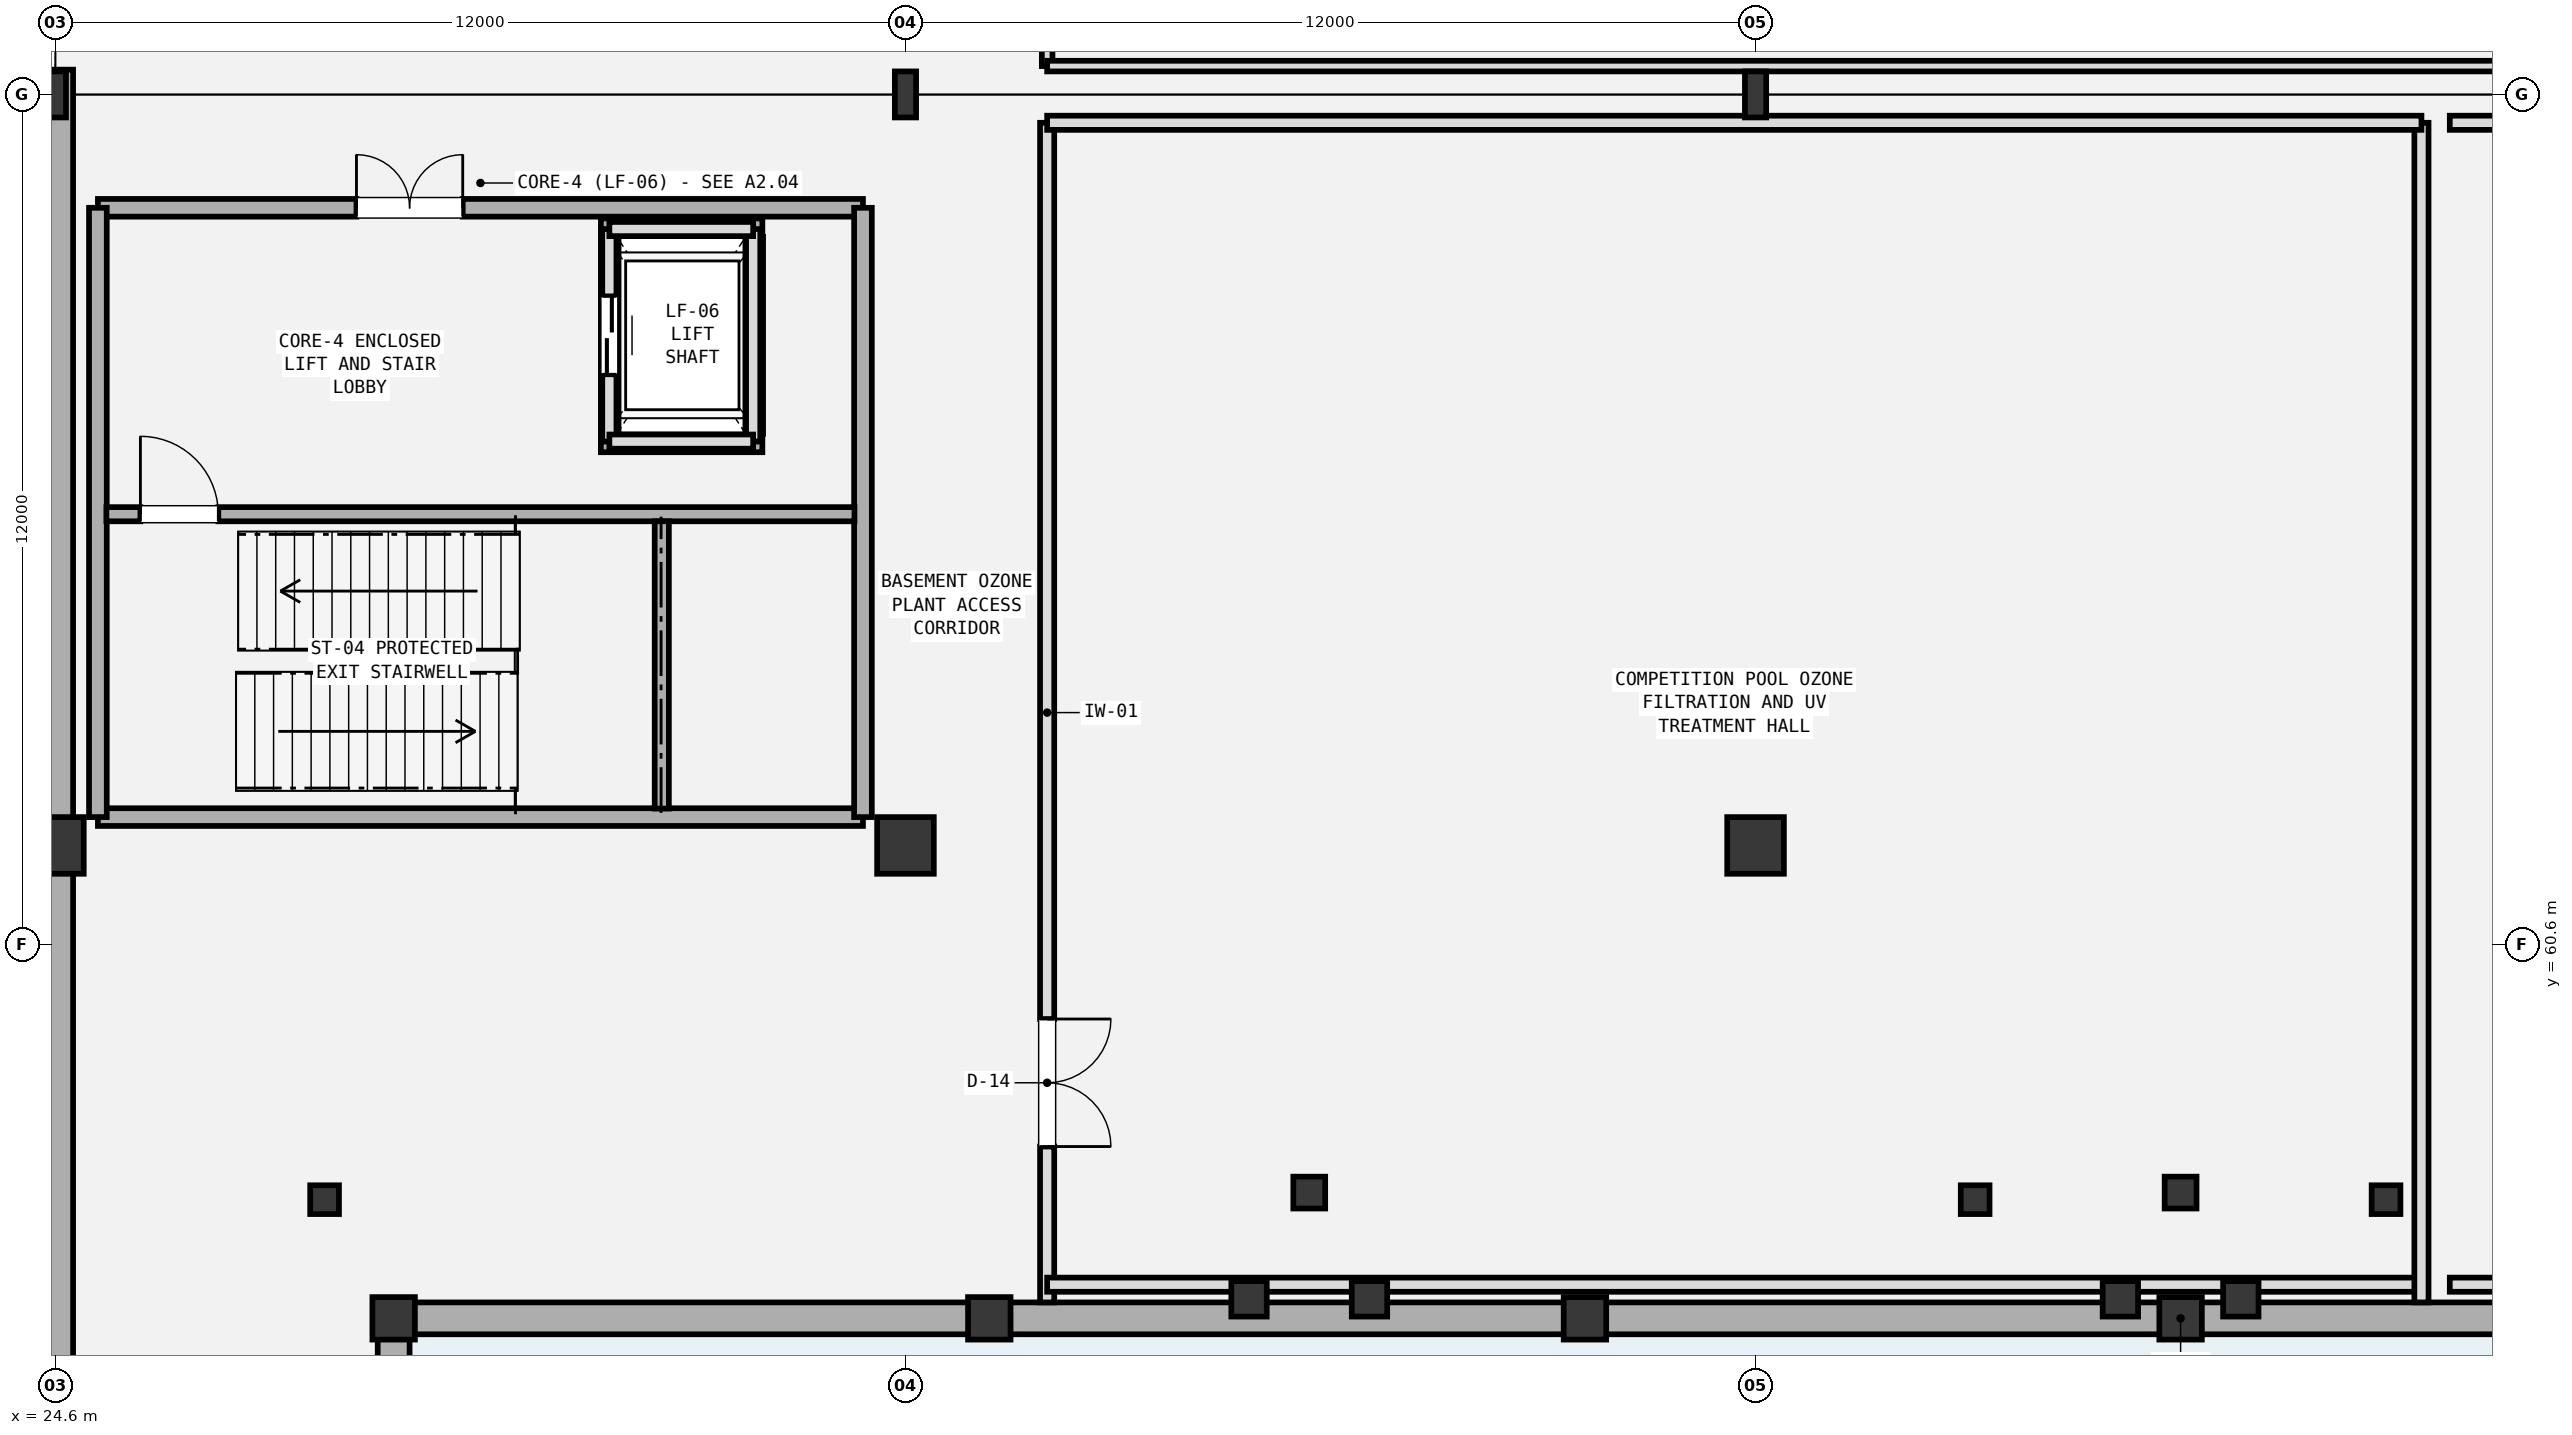
"""IFC4 building model, lengths in metres.
Left out: names, types, materials, properties, quantities, classifications, styles, units other than length and angle.
Written with IfcOpenShell. Run it as: python <this file> out.ifc"""

import sys

from ifc_helpers import new_model, si_unit, direction, frame, frame_2d, origin, origin_2d, place, context, subcontext, project, spatial, rectangle, circle, hollow_circle, i_section, extrude, element, fill, save


model = new_model("IFC4")
c1 = context("Model", 3, precision=1e-05, world=origin(), true_north=direction((0.0, 1.0)))
c2 = subcontext(c1, "Body", "Model", "MODEL_VIEW")
j1 = project(units=[si_unit("LENGTHUNIT", "METRE"), si_unit("PLANEANGLEUNIT", "RADIAN")], contexts=[c1])
p1 = place(None, origin())
s1 = spatial("IfcSite", under=j1, at=p1, CompositionType="ELEMENT")
p2 = place(p1, origin())
s2 = spatial("IfcBuilding", under=s1, at=p2, CompositionType="ELEMENT")
p3 = place(p2, frame((0.0, 0.0, -5.4)))
s3 = spatial("IfcBuildingStorey", under=s2, at=p3, CompositionType="ELEMENT", Elevation=-5.4)
for number, where, z_axis, x_axis in (
    (1, (32.3, 67.675, -1.6), (0.0, 0.0, 1.0), (1.0, 0.0, 0.0)),
    (2, (32.3, 70.725, -1.6), (0.0, 0.0, 1.0), (1.0, 0.0, 0.0)),
):
    element("IfcWall", number, at=place(p3, frame(where, z_axis=z_axis, x_axis=x_axis)), inside=s3, PredefinedType="SHEAR", context=c2, shape_type="SweptSolid", body=[
        extrude(rectangle(XDim=2.28, YDim=0.25, at=frame_2d((1.14, 0.0))), origin(), (0.0, 0.0, 1.0), 1.05),
    ])
for number, where, z_axis, x_axis in (
    (3, (32.425, 67.81, -1.6), (0.0, 0.0, 1.0), (0.0, 1.0, 0.0)),
    (4, (34.465, 67.81, -1.6), (0.0, 0.0, 1.0), (0.0, 1.0, 0.0)),
):
    element("IfcWall", number, at=place(p3, frame(where, z_axis=z_axis, x_axis=x_axis)), inside=s3, PredefinedType="SHEAR", context=c2, shape_type="SweptSolid", body=[
        extrude(rectangle(XDim=2.78, YDim=0.25, at=frame_2d((1.39, 0.0))), origin(), (0.0, 0.0, 1.0), 1.05),
    ])
for number, where, z_axis, x_axis in (
    (5, (29.375, 55.325, -0.55), (0.0, 0.0, 1.0), (1.0, 0.0, 0.0)),
    (6, (37.783, 55.325, -0.55), (0.0, 0.0, 1.0), (1.0, 0.0, 0.0)),
    (7, (46.192, 55.325, -0.55), (0.0, 0.0, 1.0), (1.0, 0.0, 0.0)),
    (8, (54.6, 55.325, -0.55), (0.0, 0.0, 1.0), (1.0, 0.0, 0.0)),
):
    element("IfcColumn", number, at=place(p3, frame(where, z_axis=z_axis, x_axis=x_axis)), inside=s3, PredefinedType="COLUMN", context=c2, shape_type="SweptSolid", body=[
        extrude(rectangle(XDim=0.6, YDim=0.6, at=origin_2d()), origin(), (0.0, 0.0, 1.0), 3.05),
    ])
p4 = place(p3, frame((29.15, 55.325, 3.2), z_axis=(0.0, 0.0, 1.0), x_axis=(1.0, 0.0, 0.0)))
e9 = element("IfcWall", 9, at=p4, inside=s3, PredefinedType="SOLIDWALL", context=c2, shape_type="SweptSolid", body=[
    extrude(rectangle(XDim=50.9, YDim=0.45, at=frame_2d((25.45, 0.0))), origin(), (0.0, 0.0, 1.0), 1.86),
])
p5 = place(p3, frame((29.375, 30.1, 3.2), z_axis=(0.0, 0.0, 1.0), x_axis=(0.0, 1.0, 0.0)))
e10 = element("IfcWall", 10, at=p5, inside=s3, PredefinedType="SOLIDWALL", context=c2, shape_type="SweptSolid", body=[
    extrude(rectangle(XDim=25.0, YDim=0.45, at=frame_2d((12.5, 0.0))), origin(), (0.0, 0.0, 1.0), 1.86),
])
p6 = place(p3, frame((24.6, 23.2, 0.0), z_axis=(0.0, 0.0, 1.0), x_axis=(0.0, 1.0, 0.0)))
e11 = element("IfcWall", 11, at=p6, inside=s3, PredefinedType="USERDEFINED", context=c2, shape_type="SweptSolid", body=[
    extrude(rectangle(XDim=49.75, YDim=0.5, at=frame_2d((24.875, 0.0))), origin(), (0.0, 0.0, 1.0), 4.98),
])
for number, where, z_axis, x_axis in (
    (12, (41.45, 55.6, 0.0), (0.0, 0.0, 1.0), (1.0, 0.0, 0.0)),
    (13, (43.15, 55.6, 0.0), (0.0, 0.0, 1.0), (1.0, 0.0, 0.0)),
    (14, (53.75, 55.6, 0.0), (0.0, 0.0, 1.0), (1.0, 0.0, 0.0)),
    (15, (55.45, 55.6, 0.0), (0.0, 0.0, 1.0), (1.0, 0.0, 0.0)),
):
    element("IfcColumn", number, at=place(p3, frame(where, z_axis=z_axis, x_axis=x_axis)), inside=s3, PredefinedType="COLUMN", context=c2, shape_type="SweptSolid", body=[
        extrude(rectangle(XDim=0.5, YDim=0.5, at=origin_2d()), origin(), (0.0, 0.0, 1.0), 4.98),
    ])
p7 = place(p3, frame((24.6, 62.0, -0.55), z_axis=(0.0, 0.0, 1.0), x_axis=(1.0, 0.0, 0.0)))
e16 = element("IfcColumn", 16, at=p7, inside=s3, PredefinedType="COLUMN", context=c2, shape_type="SweptSolid", body=[
    extrude(circle(Radius=0.4, at=origin_2d()), origin(), (0.0, 0.0, 1.0), 5.95),
])
p8 = place(p3, frame((24.6, 72.6, -0.55), z_axis=(0.0, 0.0, 1.0), x_axis=(1.0, 0.0, 0.0)))
e17 = element("IfcColumn", 17, at=p8, inside=s3, PredefinedType="COLUMN", context=c2, shape_type="SweptSolid", body=[
    extrude(i_section(OverallWidth=0.3, OverallDepth=0.65, WebThickness=0.016, FlangeThickness=0.031, FilletRadius=0.027, at=origin_2d()), origin(), (0.0, 0.0, 1.0), 5.95),
])
p9 = place(p3, frame((36.6, 62.0, -0.55), z_axis=(0.0, 0.0, 1.0), x_axis=(1.0, 0.0, 0.0)))
e18 = element("IfcColumn", 18, at=p9, inside=s3, PredefinedType="COLUMN", context=c2, shape_type="SweptSolid", body=[
    extrude(circle(Radius=0.4, at=origin_2d()), origin(), (0.0, 0.0, 1.0), 5.95),
])
p10 = place(p3, frame((36.6, 72.6, -0.55), z_axis=(0.0, 0.0, 1.0), x_axis=(1.0, 0.0, 0.0)))
e19 = element("IfcColumn", 19, at=p10, inside=s3, PredefinedType="COLUMN", context=c2, shape_type="SweptSolid", body=[
    extrude(i_section(OverallWidth=0.3, OverallDepth=0.65, WebThickness=0.016, FlangeThickness=0.031, FilletRadius=0.027, at=origin_2d()), origin(), (0.0, 0.0, 1.0), 5.95),
])
p11 = place(p3, frame((48.6, 62.0, -0.55), z_axis=(0.0, 0.0, 1.0), x_axis=(1.0, 0.0, 0.0)))
e20 = element("IfcColumn", 20, at=p11, inside=s3, PredefinedType="COLUMN", context=c2, shape_type="SweptSolid", body=[
    extrude(circle(Radius=0.4, at=origin_2d()), origin(), (0.0, 0.0, 1.0), 5.95),
])
p12 = place(p3, frame((48.6, 72.6, -0.55), z_axis=(0.0, 0.0, 1.0), x_axis=(1.0, 0.0, 0.0)))
e21 = element("IfcColumn", 21, at=p12, inside=s3, PredefinedType="COLUMN", context=c2, shape_type="SweptSolid", body=[
    extrude(i_section(OverallWidth=0.3, OverallDepth=0.65, WebThickness=0.016, FlangeThickness=0.031, FilletRadius=0.027, at=origin_2d()), origin(), (0.0, 0.0, 1.0), 5.95),
])
for number, where, z_axis, x_axis in (
    (22, (28.4, 57.0, 0.0), (0.0, 0.0, 1.0), (1.0, 0.0, 0.0)),
    (23, (51.7, 57.0, 0.0), (0.0, 0.0, 1.0), (1.0, 0.0, 0.0)),
    (24, (57.5, 57.0, 0.0), (0.0, 0.0, 1.0), (1.0, 0.0, 0.0)),
):
    element("IfcColumn", number, at=place(p3, frame(where, z_axis=z_axis, x_axis=x_axis)), inside=s3, PredefinedType="COLUMN", context=c2, shape_type="SweptSolid", body=[
        extrude(hollow_circle(Radius=0.203, WallThickness=0.016, at=origin_2d()), origin(), (0.0, 0.0, 1.0), 4.98),
    ])
p13 = place(p3, frame((25.2, 62.4, -0.15), z_axis=(0.0, 0.0, 1.0), x_axis=(1.0, 0.0, 0.0)))
e25 = element("IfcWall", 25, at=p13, inside=s3, PredefinedType="SHEAR", context=c2, shape_type="SweptSolid", body=[
    extrude(rectangle(XDim=10.8, YDim=0.25, at=frame_2d((5.4, 0.0))), origin(), (0.0, 0.0, 1.0), 5.13),
])
p14 = place(p3, frame((25.2, 71.0, -0.15), z_axis=(0.0, 0.0, 1.0), x_axis=(1.0, 0.0, 0.0)))
e26 = element("IfcWall", 26, at=p14, inside=s3, PredefinedType="SHEAR", context=c2, shape_type="SweptSolid", body=[
    extrude(rectangle(XDim=10.8, YDim=0.25, at=frame_2d((5.4, 0.0))), origin(), (0.0, 0.0, 1.0), 5.13),
])
p15 = place(p14, frame((3.65, 0.0, 0.15)))
e27 = element("IfcOpeningElement", 27, at=p15, cuts=e26, PredefinedType="OPENING", context=c2, shape_type="SweptSolid", body=[
    extrude(rectangle(XDim=1.5, YDim=2.2, at=frame_2d((0.75, 1.1))), frame((0.0, 0.135, 0.0), z_axis=(0.0, -1.0, 0.0), x_axis=(1.0, 0.0, 0.0)), (0.0, 0.0, 1.0), 0.27),
])
for number, where, z_axis, x_axis in (
    (28, (25.2, 62.4, -0.15), (0.0, 0.0, 1.0), (0.0, 1.0, 0.0)),
    (29, (36.0, 62.4, -0.15), (0.0, 0.0, 1.0), (0.0, 1.0, 0.0)),
):
    element("IfcWall", number, at=place(p3, frame(where, z_axis=z_axis, x_axis=x_axis)), inside=s3, PredefinedType="SHEAR", context=c2, shape_type="SweptSolid", body=[
        extrude(rectangle(XDim=8.6, YDim=0.25, at=frame_2d((4.3, 0.0))), origin(), (0.0, 0.0, 1.0), 5.13),
    ])
p16 = place(p3, frame((25.32, 66.675, -0.15), z_axis=(0.0, 0.0, 1.0), x_axis=(1.0, 0.0, 0.0)))
e30 = element("IfcWall", 30, at=p16, inside=s3, PredefinedType="SHEAR", context=c2, shape_type="SweptSolid", body=[
    extrude(rectangle(XDim=10.56, YDim=0.2, at=frame_2d((5.28, 0.0))), origin(), (0.0, 0.0, 1.0), 5.13),
])
p17 = place(p16, frame((0.48, 0.0, 0.15)))
e31 = element("IfcOpeningElement", 31, at=p17, cuts=e30, PredefinedType="OPENING", context=c2, shape_type="SweptSolid", body=[
    extrude(rectangle(XDim=1.1, YDim=2.2, at=frame_2d((0.55, 1.1))), frame((0.0, 0.11, 0.0), z_axis=(0.0, -1.0, 0.0), x_axis=(1.0, 0.0, 0.0)), (0.0, 0.0, 1.0), 0.22),
])
p18 = place(p3, frame((33.16, 62.52, -0.15), z_axis=(0.0, 0.0, 1.0), x_axis=(0.0, 1.0, 0.0)))
e32 = element("IfcWall", 32, at=p18, inside=s3, PredefinedType="SHEAR", context=c2, shape_type="SweptSolid", body=[
    extrude(rectangle(XDim=4.055, YDim=0.2, at=frame_2d((2.027, 0.0))), origin(), (0.0, 0.0, 1.0), 5.13),
])
p19 = place(p3, frame((32.42, 67.7, -0.15), z_axis=(0.0, 0.0, 1.0), x_axis=(0.0, 1.0, 0.0)))
e33 = element("IfcWall", 33, at=p19, inside=s3, PredefinedType="SOLIDWALL", context=c2, shape_type="SweptSolid", body=[
    extrude(rectangle(XDim=3.0, YDim=0.2, at=frame_2d((1.5, 0.0))), origin(), (0.0, 0.0, 1.0), 5.13),
])
p20 = place(p19, frame((0.95, 0.0, 0.15)))
e34 = element("IfcOpeningElement", 34, at=p20, cuts=e33, PredefinedType="OPENING", context=c2, shape_type="SweptSolid", body=[
    extrude(rectangle(XDim=1.1, YDim=2.2, at=frame_2d((0.55, 1.1))), frame((0.0, 0.11, 0.0), z_axis=(0.0, -1.0, 0.0), x_axis=(1.0, 0.0, 0.0)), (0.0, 0.0, 1.0), 0.22),
])
p21 = place(p3, frame((34.45, 67.7, -0.15), z_axis=(0.0, 0.0, 1.0), x_axis=(0.0, 1.0, 0.0)))
e35 = element("IfcWall", 35, at=p21, inside=s3, PredefinedType="SOLIDWALL", context=c2, shape_type="SweptSolid", body=[
    extrude(rectangle(XDim=3.0, YDim=0.2, at=frame_2d((1.5, 0.0))), origin(), (0.0, 0.0, 1.0), 5.13),
])
for number, where, z_axis, x_axis in (
    (36, (32.42, 67.7, -0.15), (0.0, 0.0, 1.0), (1.0, 0.0, 0.0)),
    (37, (32.42, 70.7, -0.15), (0.0, 0.0, 1.0), (1.0, 0.0, 0.0)),
):
    element("IfcWall", number, at=place(p3, frame(where, z_axis=z_axis, x_axis=x_axis)), inside=s3, PredefinedType="SOLIDWALL", context=c2, shape_type="SweptSolid", body=[
        extrude(rectangle(XDim=2.03, YDim=0.2, at=frame_2d((1.015, 0.0))), origin(), (0.0, 0.0, 1.0), 5.13),
    ])
p22 = place(p3, frame((38.6, 55.55, 0.0), z_axis=(0.0, 0.0, 1.0), x_axis=(0.0, 1.0, 0.0)))
e38 = element("IfcWall", 38, at=p22, inside=s3, PredefinedType="SOLIDWALL", context=c2, shape_type="SweptSolid", body=[
    extrude(rectangle(XDim=16.65, YDim=0.2, at=frame_2d((8.325, 0.0))), origin(), (0.0, 0.0, 1.0), 3.8),
])
p23 = place(p22, frame((2.2, 0.0, 0.0)))
e39 = element("IfcOpeningElement", 39, at=p23, cuts=e38, PredefinedType="OPENING", context=c2, shape_type="SweptSolid", body=[
    extrude(rectangle(XDim=1.8, YDim=2.4, at=frame_2d((0.9, 1.2))), frame((0.0, 0.11, 0.0), z_axis=(0.0, -1.0, 0.0), x_axis=(1.0, 0.0, 0.0)), (0.0, 0.0, 1.0), 0.22),
])
p24 = place(p3, frame((38.6, 55.8, 0.0), z_axis=(0.0, 0.0, 1.0), x_axis=(1.0, 0.0, 0.0)))
e40 = element("IfcWall", 40, at=p24, inside=s3, PredefinedType="SOLIDWALL", context=c2, shape_type="SweptSolid", body=[
    extrude(rectangle(XDim=19.4, YDim=0.2, at=frame_2d((9.7, 0.0))), origin(), (0.0, 0.0, 1.0), 3.8),
])
p25 = place(p3, frame((58.0, 55.55, 0.0), z_axis=(0.0, 0.0, 1.0), x_axis=(0.0, 1.0, 0.0)))
e41 = element("IfcWall", 41, at=p25, inside=s3, PredefinedType="SOLIDWALL", context=c2, shape_type="SweptSolid", body=[
    extrude(rectangle(XDim=16.65, YDim=0.2, at=frame_2d((8.325, 0.0))), origin(), (0.0, 0.0, 1.0), 3.8),
])
p26 = place(p3, frame((38.6, 72.2, 0.0), z_axis=(0.0, 0.0, 1.0), x_axis=(1.0, 0.0, 0.0)))
e42 = element("IfcWall", 42, at=p26, inside=s3, PredefinedType="SOLIDWALL", context=c2, shape_type="SweptSolid", body=[
    extrude(rectangle(XDim=19.4, YDim=0.2, at=frame_2d((9.7, 0.0))), origin(), (0.0, 0.0, 1.0), 3.78),
])
p27 = place(p3, frame((58.4, 55.8, 0.0), z_axis=(0.0, 0.0, 1.0), x_axis=(1.0, 0.0, 0.0)))
e43 = element("IfcWall", 43, at=p27, inside=s3, PredefinedType="SOLIDWALL", context=c2, shape_type="SweptSolid", body=[
    extrude(rectangle(XDim=19.6, YDim=0.2, at=frame_2d((9.8, 0.0))), origin(), (0.0, 0.0, 1.0), 3.8),
])
p28 = place(p27, frame((5.0, 0.0, 0.0)))
e44 = element("IfcOpeningElement", 44, at=p28, cuts=e43, PredefinedType="OPENING", context=c2, shape_type="SweptSolid", body=[
    extrude(rectangle(XDim=1.8, YDim=2.4, at=frame_2d((0.9, 1.2))), frame((0.0, 0.11, 0.0), z_axis=(0.0, -1.0, 0.0), x_axis=(1.0, 0.0, 0.0)), (0.0, 0.0, 1.0), 0.22),
])
p29 = place(p3, frame((58.4, 72.2, 0.0), z_axis=(0.0, 0.0, 1.0), x_axis=(1.0, 0.0, 0.0)))
e45 = element("IfcWall", 45, at=p29, inside=s3, PredefinedType="SOLIDWALL", context=c2, shape_type="SweptSolid", body=[
    extrude(rectangle(XDim=19.6, YDim=0.2, at=frame_2d((9.8, 0.0))), origin(), (0.0, 0.0, 1.0), 3.78),
])
p30 = place(p3, frame((38.6, 73.0, 0.0), z_axis=(0.0, 0.0, 1.0), x_axis=(0.0, 1.0, 0.0)))
e46 = element("IfcWall", 46, at=p30, inside=s3, PredefinedType="PARTITIONING", context=c2, shape_type="SweptSolid", body=[
    extrude(rectangle(XDim=17.0, YDim=0.15, at=frame_2d((8.5, 0.0))), origin(), (0.0, 0.0, 1.0), 3.8),
])
p31 = place(p30, frame((6.0, 0.0, 0.0)))
e47 = element("IfcOpeningElement", 47, at=p31, cuts=e46, PredefinedType="OPENING", context=c2, shape_type="SweptSolid", body=[
    extrude(rectangle(XDim=1.6, YDim=2.2, at=frame_2d((0.8, 1.1))), frame((0.0, 0.085, 0.0), z_axis=(0.0, -1.0, 0.0), x_axis=(1.0, 0.0, 0.0)), (0.0, 0.0, 1.0), 0.17),
])
p32 = place(p3, frame((38.6, 73.0, 0.0), z_axis=(0.0, 0.0, 1.0), x_axis=(1.0, 0.0, 0.0)))
e48 = element("IfcWall", 48, at=p32, inside=s3, PredefinedType="PARTITIONING", context=c2, shape_type="SweptSolid", body=[
    extrude(rectangle(XDim=21.75, YDim=0.15, at=frame_2d((10.875, 0.0))), origin(), (0.0, 0.0, 1.0), 3.78),
])
for number, where, z_axis, x_axis in (
    (49, (42.3, 57.1, 0.0), (0.0, 0.0, 1.0), (1.0, 0.0, 0.0)),
    (50, (54.6, 57.1, 0.0), (0.0, 0.0, 1.0), (1.0, 0.0, 0.0)),
):
    element("IfcColumn", number, at=place(p3, frame(where, z_axis=z_axis, x_axis=x_axis)), inside=s3, PredefinedType="COLUMN", context=c2, shape_type="SweptSolid", body=[
        extrude(rectangle(XDim=0.45, YDim=0.45, at=origin_2d()), origin(), (0.0, 0.0, 1.0), 4.98),
    ])
p33 = place(p15, origin())
e51 = element("IfcDoor", 51, at=p33, inside=s3, OperationType="DOUBLE_DOOR_SINGLE_SWING", PredefinedType="DOOR", context=c2, shape_type="SweptSolid", body=[
    extrude(rectangle(XDim=1.5, YDim=2.2, at=frame_2d((0.75, 1.1))), frame((0.0, 0.025, 0.0), z_axis=(0.0, -1.0, 0.0), x_axis=(1.0, 0.0, 0.0)), (0.0, 0.0, 1.0), 0.05),
])
fill(e27, e51)
p34 = place(p17, origin())
e52 = element("IfcDoor", 52, at=p34, inside=s3, OperationType="SINGLE_SWING_LEFT", PredefinedType="DOOR", context=c2, shape_type="SweptSolid", body=[
    extrude(rectangle(XDim=1.1, YDim=2.2, at=frame_2d((0.55, 1.1))), frame((0.0, 0.025, 0.0), z_axis=(0.0, -1.0, 0.0), x_axis=(1.0, 0.0, 0.0)), (0.0, 0.0, 1.0), 0.05),
])
fill(e31, e52)
p35 = place(p20, origin())
e53 = element("IfcDoor", 53, at=p35, inside=s3, OperationType="DOUBLE_DOOR_SLIDING", PredefinedType="DOOR", context=c2, shape_type="SweptSolid", body=[
    extrude(rectangle(XDim=1.1, YDim=2.2, at=frame_2d((0.55, 1.1))), frame((0.0, 0.025, 0.0), z_axis=(0.0, -1.0, 0.0), x_axis=(1.0, 0.0, 0.0)), (0.0, 0.0, 1.0), 0.05),
])
fill(e34, e53)
p36 = place(p23, frame((1.8, 0.0, 0.0), z_axis=(0.0, 0.0, 1.0), x_axis=(-1.0, 0.0, 0.0)))
e54 = element("IfcDoor", 54, at=p36, inside=s3, OperationType="DOUBLE_DOOR_SINGLE_SWING", PredefinedType="DOOR", context=c2, shape_type="SweptSolid", body=[
    extrude(rectangle(XDim=1.8, YDim=2.4, at=frame_2d((0.9, 1.2))), frame((0.0, 0.025, 0.0), z_axis=(0.0, -1.0, 0.0), x_axis=(1.0, 0.0, 0.0)), (0.0, 0.0, 1.0), 0.05),
])
fill(e39, e54)
save(model, sys.argv[1])
